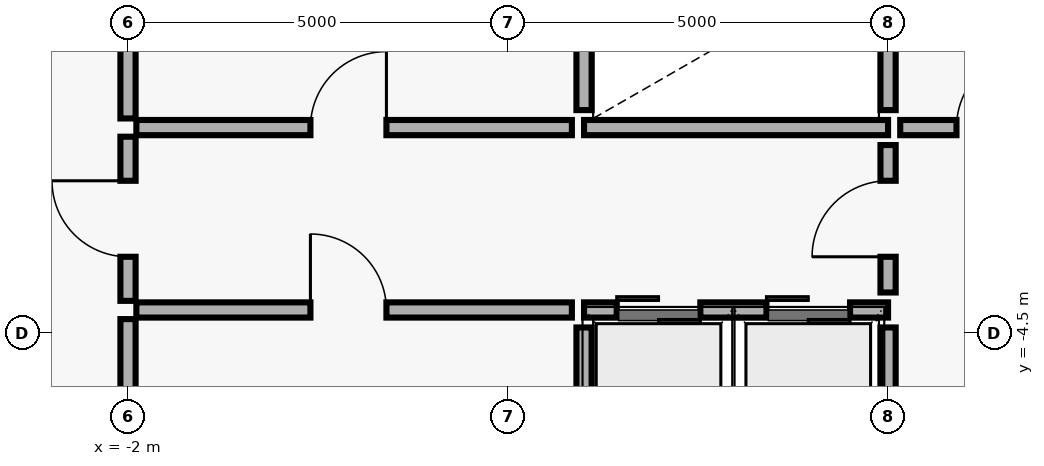
"""IFC4 building model, lengths in metres.
Left out: names, types, materials, properties, quantities, classifications, styles, units other than length and angle.
Written with IfcOpenShell. Run it as: python <this file> out.ifc"""

import sys

from ifc_helpers import new_model, si_unit, direction, frame, frame_2d, origin, place, context, subcontext, project, spatial, rectangle, extrude, element, fill, save


model = new_model("IFC4")
c1 = context("Model", 3, precision=1e-05, world=origin(), true_north=direction((0.0, 1.0)))
c2 = subcontext(c1, "Body", "Model", "MODEL_VIEW")
j1 = project(units=[si_unit("LENGTHUNIT", "METRE"), si_unit("PLANEANGLEUNIT", "RADIAN")], contexts=[c1])
p1 = place(None, origin())
s1 = spatial("IfcSite", under=j1, at=p1, CompositionType="ELEMENT")
p2 = place(p1, origin())
s2 = spatial("IfcBuilding", under=s1, at=p2, CompositionType="ELEMENT")
p3 = place(p2, frame((0.0, 0.0, 229.2)))
s3 = spatial("IfcBuildingStorey", under=s2, at=p3, CompositionType="ELEMENT", Elevation=229.2)
p4 = place(p3, frame((4.0, -1.8, 0.0), z_axis=(0.0, 0.0, 1.0), x_axis=(1.0, 0.0, 0.0)))
e1 = element("IfcWall", 1, at=p4, inside=s3, PredefinedType="SOLIDWALL", context=c2, shape_type="SweptSolid", body=[
    extrude(rectangle(XDim=4.0, YDim=0.2, at=frame_2d((2.0, 0.0))), origin(), (0.0, 0.0, 1.0), 3.36),
])
p5 = place(p3, frame((4.0, -1.57, 0.0), z_axis=(0.0, 0.0, 1.0), x_axis=(0.0, 1.0, 0.0)))
e2 = element("IfcWall", 2, at=p5, inside=s3, PredefinedType="SOLIDWALL", context=c2, shape_type="SweptSolid", body=[
    extrude(rectangle(XDim=1.94, YDim=0.2, at=frame_2d((0.97, 0.0))), origin(), (0.0, 0.0, 1.0), 3.36),
])
p6 = place(p3, frame((8.0, -1.57, 0.0), z_axis=(0.0, 0.0, 1.0), x_axis=(0.0, 1.0, 0.0)))
e3 = element("IfcWall", 3, at=p6, inside=s3, PredefinedType="SOLIDWALL", context=c2, shape_type="SweptSolid", body=[
    extrude(rectangle(XDim=2.05, YDim=0.2, at=frame_2d((1.025, 0.0))), origin(), (0.0, 0.0, 1.0), 3.072),
])
p7 = place(p3, frame((4.0, -4.2, 0.0), z_axis=(0.0, 0.0, 1.0), x_axis=(1.0, 0.0, 0.0)))
e4 = element("IfcWall", 4, at=p7, inside=s3, PredefinedType="SOLIDWALL", context=c2, shape_type="SweptSolid", body=[
    extrude(rectangle(XDim=4.0, YDim=0.2, at=frame_2d((2.0, 0.0))), origin(), (0.0, 0.0, 1.0), 3.36),
])
p8 = place(p7, frame((0.43, 0.0, 0.0)))
e5 = element("IfcOpeningElement", 5, at=p8, cuts=e4, PredefinedType="OPENING", context=c2, shape_type="SweptSolid", body=[
    extrude(rectangle(XDim=1.1, YDim=2.2, at=frame_2d((0.55, 1.1))), frame((0.0, 0.11, 0.0), z_axis=(0.0, -1.0, 0.0), x_axis=(1.0, 0.0, 0.0)), (0.0, 0.0, 1.0), 0.22),
])
p9 = place(p7, frame((2.4, 0.0, 0.0)))
e6 = element("IfcOpeningElement", 6, at=p9, cuts=e4, PredefinedType="OPENING", context=c2, shape_type="SweptSolid", body=[
    extrude(rectangle(XDim=1.1, YDim=2.2, at=frame_2d((0.55, 1.1))), frame((0.0, 0.11, 0.0), z_axis=(0.0, -1.0, 0.0), x_axis=(1.0, 0.0, 0.0)), (0.0, 0.0, 1.0), 0.22),
])
p10 = place(p3, frame((4.0, -6.37, 0.0), z_axis=(0.0, 0.0, 1.0), x_axis=(0.0, 1.0, 0.0)))
e7 = element("IfcWall", 7, at=p10, inside=s3, PredefinedType="SOLIDWALL", context=c2, shape_type="SweptSolid", body=[
    extrude(rectangle(XDim=1.94, YDim=0.2, at=frame_2d((0.97, 0.0))), origin(), (0.0, 0.0, 1.0), 3.36),
])
p11 = place(p3, frame((8.0, -6.37, 0.0), z_axis=(0.0, 0.0, 1.0), x_axis=(0.0, 1.0, 0.0)))
e8 = element("IfcWall", 8, at=p11, inside=s3, PredefinedType="SOLIDWALL", context=c2, shape_type="SweptSolid", body=[
    extrude(rectangle(XDim=1.94, YDim=0.2, at=frame_2d((0.97, 0.0))), origin(), (0.0, 0.0, 1.0), 3.072),
])
p12 = place(p3, frame((-2.0, -4.08, 0.0), z_axis=(0.0, 0.0, 1.0), x_axis=(0.0, 1.0, 0.0)))
e9 = element("IfcWall", 9, at=p12, inside=s3, PredefinedType="MOVABLE", context=c2, shape_type="SweptSolid", body=[
    extrude(rectangle(XDim=2.16, YDim=0.2, at=frame_2d((1.08, 0.0))), origin(), (0.0, 0.0, 1.0), 3.072),
])
p13 = place(p12, frame((0.58, 0.0, 0.0)))
e10 = element("IfcOpeningElement", 10, at=p13, cuts=e9, PredefinedType="OPENING", context=c2, shape_type="SweptSolid", body=[
    extrude(rectangle(XDim=1.0, YDim=2.1, at=frame_2d((0.5, 1.05))), frame((0.0, 0.11, 0.0), z_axis=(0.0, -1.0, 0.0), x_axis=(1.0, 0.0, 0.0)), (0.0, 0.0, 1.0), 0.22),
])
p14 = place(p3, frame((8.0, -3.97, 0.0), z_axis=(0.0, 0.0, 1.0), x_axis=(0.0, 1.0, 0.0)))
e11 = element("IfcWall", 11, at=p14, inside=s3, PredefinedType="MOVABLE", context=c2, shape_type="SweptSolid", body=[
    extrude(rectangle(XDim=1.94, YDim=0.2, at=frame_2d((0.97, 0.0))), origin(), (0.0, 0.0, 1.0), 3.072),
])
p15 = place(p14, frame((0.47, 0.0, 0.0)))
e12 = element("IfcOpeningElement", 12, at=p15, cuts=e11, PredefinedType="OPENING", context=c2, shape_type="SweptSolid", body=[
    extrude(rectangle(XDim=1.0, YDim=2.1, at=frame_2d((0.5, 1.05))), frame((0.0, 0.11, 0.0), z_axis=(0.0, -1.0, 0.0), x_axis=(1.0, 0.0, 0.0)), (0.0, 0.0, 1.0), 0.22),
])
p16 = place(p3, frame((-1.89, -1.8, 0.0), z_axis=(0.0, 0.0, 1.0), x_axis=(1.0, 0.0, 0.0)))
e13 = element("IfcWall", 13, at=p16, inside=s3, PredefinedType="MOVABLE", context=c2, shape_type="SweptSolid", body=[
    extrude(rectangle(XDim=5.73, YDim=0.2, at=frame_2d((2.865, 0.0))), origin(), (0.0, 0.0, 1.0), 3.36),
])
p17 = place(p16, frame((2.29, 0.0, 0.0)))
e14 = element("IfcOpeningElement", 14, at=p17, cuts=e13, PredefinedType="OPENING", context=c2, shape_type="SweptSolid", body=[
    extrude(rectangle(XDim=1.0, YDim=2.1, at=frame_2d((0.5, 1.05))), frame((0.0, 0.11, 0.0), z_axis=(0.0, -1.0, 0.0), x_axis=(1.0, 0.0, 0.0)), (0.0, 0.0, 1.0), 0.22),
])
p18 = place(p3, frame((-1.89, -4.2, 0.0), z_axis=(0.0, 0.0, 1.0), x_axis=(1.0, 0.0, 0.0)))
e15 = element("IfcWall", 15, at=p18, inside=s3, PredefinedType="MOVABLE", context=c2, shape_type="SweptSolid", body=[
    extrude(rectangle(XDim=5.73, YDim=0.2, at=frame_2d((2.865, 0.0))), origin(), (0.0, 0.0, 1.0), 3.36),
])
p19 = place(p18, frame((2.29, 0.0, 0.0)))
e16 = element("IfcOpeningElement", 16, at=p19, cuts=e15, PredefinedType="OPENING", context=c2, shape_type="SweptSolid", body=[
    extrude(rectangle(XDim=1.0, YDim=2.1, at=frame_2d((0.5, 1.05))), frame((0.0, 0.11, 0.0), z_axis=(0.0, -1.0, 0.0), x_axis=(1.0, 0.0, 0.0)), (0.0, 0.0, 1.0), 0.22),
])
p20 = place(p3, frame((8.16, -1.8, 0.0), z_axis=(0.0, 0.0, 1.0), x_axis=(1.0, 0.0, 0.0)))
e17 = element("IfcWall", 17, at=p20, inside=s3, PredefinedType="MOVABLE", context=c2, shape_type="SweptSolid", body=[
    extrude(rectangle(XDim=2.64, YDim=0.2, at=frame_2d((1.32, 0.0))), origin(), (0.0, 0.0, 1.0), 3.36),
])
p21 = place(p20, frame((0.74, 0.0, 0.0)))
e18 = element("IfcOpeningElement", 18, at=p21, cuts=e17, PredefinedType="OPENING", context=c2, shape_type="SweptSolid", body=[
    extrude(rectangle(XDim=1.0, YDim=2.1, at=frame_2d((0.5, 1.05))), frame((0.0, 0.11, 0.0), z_axis=(0.0, -1.0, 0.0), x_axis=(1.0, 0.0, 0.0)), (0.0, 0.0, 1.0), 0.22),
])
p22 = place(p3, frame((-2.0, -1.68, 0.0), z_axis=(0.0, 0.0, 1.0), x_axis=(0.0, 1.0, 0.0)))
e19 = element("IfcWall", 19, at=p22, inside=s3, PredefinedType="MOVABLE", context=c2, shape_type="SweptSolid", body=[
    extrude(rectangle(XDim=2.16, YDim=0.2, at=frame_2d((1.08, 0.0))), origin(), (0.0, 0.0, 1.0), 3.072),
])
p23 = place(p3, frame((-2.0, -6.37, 0.0), z_axis=(0.0, 0.0, 1.0), x_axis=(0.0, 1.0, 0.0)))
e20 = element("IfcWall", 20, at=p23, inside=s3, PredefinedType="MOVABLE", context=c2, shape_type="SweptSolid", body=[
    extrude(rectangle(XDim=2.05, YDim=0.2, at=frame_2d((1.025, 0.0))), origin(), (0.0, 0.0, 1.0), 3.072),
])
p24 = place(p13, origin())
e21 = element("IfcDoor", 21, at=p24, inside=s3, OperationType="SINGLE_SWING_RIGHT", PredefinedType="DOOR", context=c2, shape_type="SweptSolid", body=[
    extrude(rectangle(XDim=1.0, YDim=2.1, at=frame_2d((0.5, 1.05))), frame((0.0, 0.025, 0.0), z_axis=(0.0, -1.0, 0.0), x_axis=(1.0, 0.0, 0.0)), (0.0, 0.0, 1.0), 0.05),
])
fill(e10, e21)
p25 = place(p15, origin())
e22 = element("IfcDoor", 22, at=p25, inside=s3, OperationType="SINGLE_SWING_LEFT", PredefinedType="DOOR", context=c2, shape_type="SweptSolid", body=[
    extrude(rectangle(XDim=1.0, YDim=2.1, at=frame_2d((0.5, 1.05))), frame((0.0, 0.025, 0.0), z_axis=(0.0, -1.0, 0.0), x_axis=(1.0, 0.0, 0.0)), (0.0, 0.0, 1.0), 0.05),
])
fill(e12, e22)
p26 = place(p17, origin())
e23 = element("IfcDoor", 23, at=p26, inside=s3, OperationType="SINGLE_SWING_RIGHT", PredefinedType="DOOR", context=c2, shape_type="SweptSolid", body=[
    extrude(rectangle(XDim=1.0, YDim=2.1, at=frame_2d((0.5, 1.05))), frame((0.0, 0.025, 0.0), z_axis=(0.0, -1.0, 0.0), x_axis=(1.0, 0.0, 0.0)), (0.0, 0.0, 1.0), 0.05),
])
fill(e14, e23)
p27 = place(p19, origin())
e24 = element("IfcDoor", 24, at=p27, inside=s3, OperationType="SINGLE_SWING_LEFT", PredefinedType="DOOR", context=c2, shape_type="SweptSolid", body=[
    extrude(rectangle(XDim=1.0, YDim=2.1, at=frame_2d((0.5, 1.05))), frame((0.0, 0.025, 0.0), z_axis=(0.0, -1.0, 0.0), x_axis=(1.0, 0.0, 0.0)), (0.0, 0.0, 1.0), 0.05),
])
fill(e16, e24)
p28 = place(p21, origin())
e25 = element("IfcDoor", 25, at=p28, inside=s3, OperationType="SINGLE_SWING_RIGHT", PredefinedType="DOOR", context=c2, shape_type="SweptSolid", body=[
    extrude(rectangle(XDim=1.0, YDim=2.1, at=frame_2d((0.5, 1.05))), frame((0.0, 0.025, 0.0), z_axis=(0.0, -1.0, 0.0), x_axis=(1.0, 0.0, 0.0)), (0.0, 0.0, 1.0), 0.05),
])
fill(e18, e25)
p29 = place(p8, origin())
e26 = element("IfcDoor", 26, at=p29, inside=s3, OperationType="DOUBLE_DOOR_SLIDING", PredefinedType="DOOR", context=c2, shape_type="SweptSolid", body=[
    extrude(rectangle(XDim=1.1, YDim=2.2, at=frame_2d((0.55, 1.1))), frame((0.0, 0.025, 0.0), z_axis=(0.0, -1.0, 0.0), x_axis=(1.0, 0.0, 0.0)), (0.0, 0.0, 1.0), 0.05),
])
fill(e5, e26)
p30 = place(p9, origin())
e27 = element("IfcDoor", 27, at=p30, inside=s3, OperationType="DOUBLE_DOOR_SLIDING", PredefinedType="DOOR", context=c2, shape_type="SweptSolid", body=[
    extrude(rectangle(XDim=1.1, YDim=2.2, at=frame_2d((0.55, 1.1))), frame((0.0, 0.025, 0.0), z_axis=(0.0, -1.0, 0.0), x_axis=(1.0, 0.0, 0.0)), (0.0, 0.0, 1.0), 0.05),
])
fill(e6, e27)
save(model, sys.argv[1])
